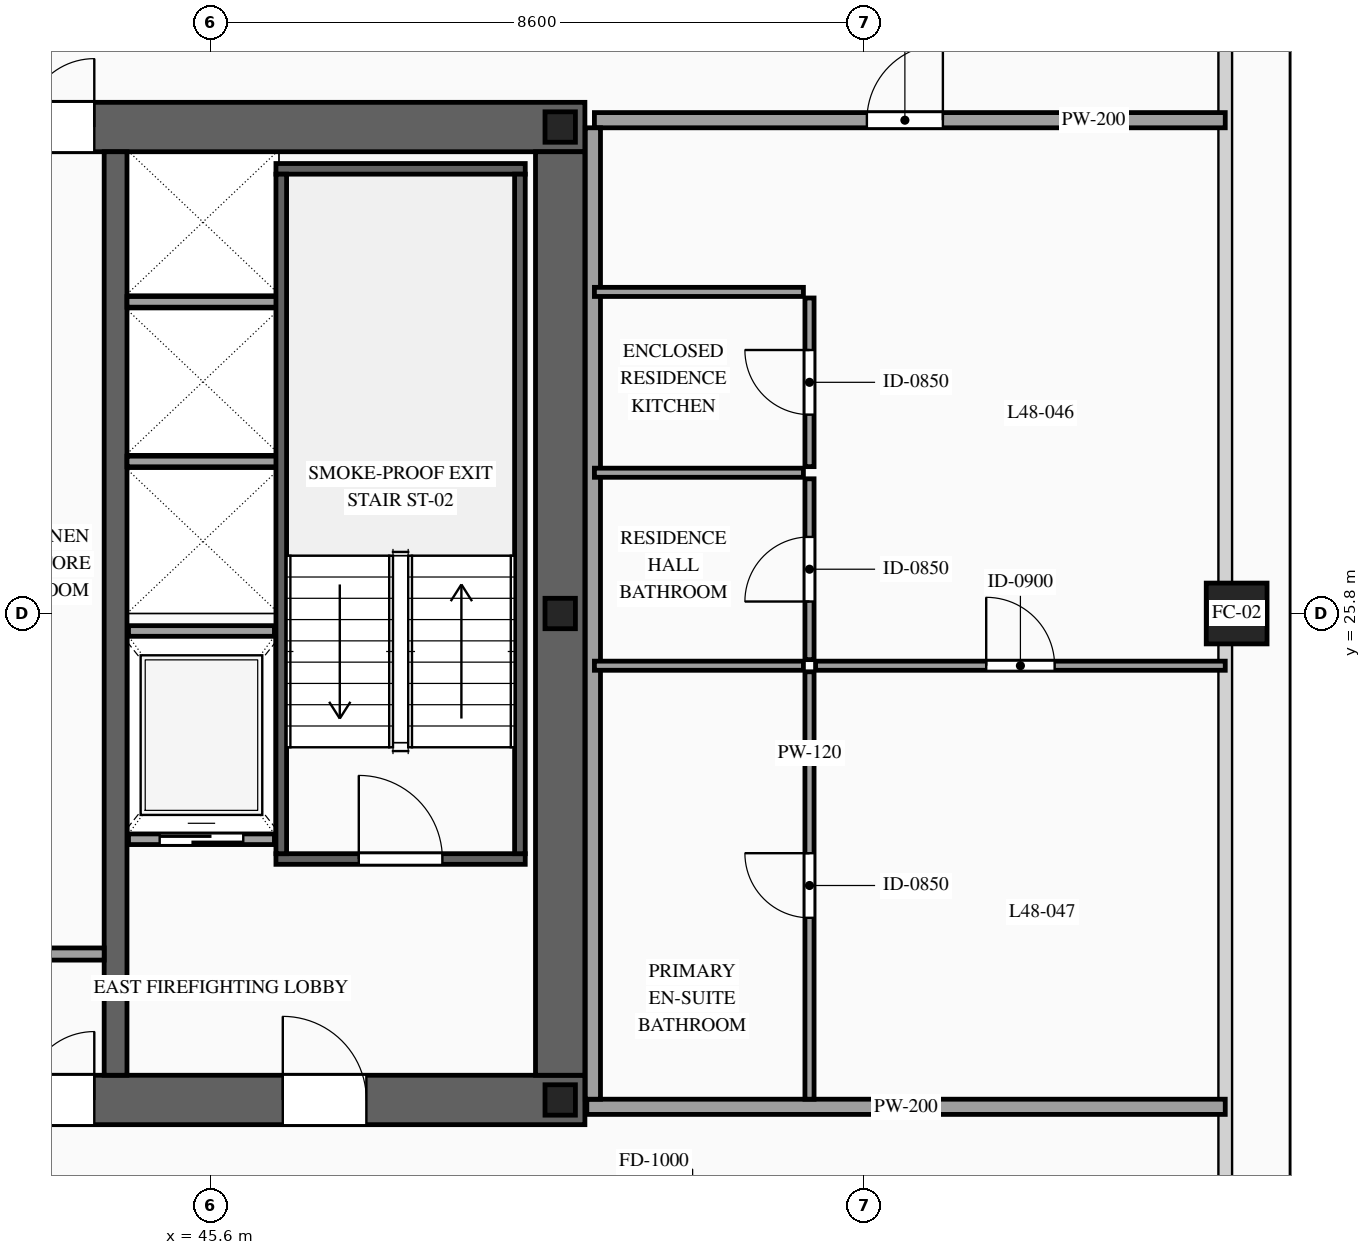
"""IFC4 building model, lengths in metres.
Left out: names, types, materials, properties, quantities, classifications, styles, units other than length and angle.
Written with IfcOpenShell. Run it as: python <this file> out.ifc"""

import sys

from ifc_helpers import new_model, si_unit, direction, frame, frame_2d, origin, origin_2d, place, context, subcontext, project, spatial, rectangle, hollow_rectangle, i_section, extrude, source, transform, mapped, element, fill, save


model = new_model("IFC4")
c1 = context("Model", 3, precision=1e-05, world=origin(), true_north=direction((0.0, 1.0)))
c2 = subcontext(c1, "Body", "Model", "MODEL_VIEW")
j1 = project(units=[si_unit("LENGTHUNIT", "METRE"), si_unit("PLANEANGLEUNIT", "RADIAN")], contexts=[c1])
p1 = place(None, origin())
s1 = spatial("IfcSite", under=j1, at=p1, CompositionType="ELEMENT")
p2 = place(p1, origin())
s2 = spatial("IfcBuilding", under=s1, at=p2, CompositionType="ELEMENT")
p3 = place(p2, frame((0.0, 0.0, 184.5)))
s3 = spatial("IfcBuildingStorey", under=s2, at=p3, CompositionType="ELEMENT", Elevation=184.5)
p4 = place(p3, frame((23.475, 19.4, 0.0), z_axis=(0.0, 0.0, 1.0), x_axis=(1.0, 0.0, 0.0)))
e1 = element("IfcWall", 1, at=p4, inside=s3, PredefinedType="SHEAR", context=c2, shape_type="SweptSolid", body=[
    extrude(rectangle(XDim=27.05, YDim=0.65, at=frame_2d((13.525, 0.0))), origin(), (0.0, 0.0, 1.0), 3.5),
])
p5 = place(p4, frame((1.975, 0.0, 0.0)))
e2 = element("IfcOpeningElement", 2, at=p5, cuts=e1, PredefinedType="OPENING", context=c2, shape_type="SweptSolid", body=[
    extrude(rectangle(XDim=1.1, YDim=2.2, at=frame_2d((0.55, 1.1))), frame((0.0, 0.34, 0.0), z_axis=(0.0, -1.0, 0.0), x_axis=(1.0, 0.0, 0.0)), (0.0, 0.0, 1.0), 0.68),
])
p6 = place(p4, frame((9.875, 0.0, 0.0)))
e3 = element("IfcOpeningElement", 3, at=p6, cuts=e1, PredefinedType="OPENING", context=c2, shape_type="SweptSolid", body=[
    extrude(rectangle(XDim=1.1, YDim=2.2, at=frame_2d((0.55, 1.1))), frame((0.0, 0.34, 0.0), z_axis=(0.0, -1.0, 0.0), x_axis=(1.0, 0.0, 0.0)), (0.0, 0.0, 1.0), 0.68),
])
p7 = place(p4, frame((23.075, 0.0, 0.0)))
e4 = element("IfcOpeningElement", 4, at=p7, cuts=e1, PredefinedType="OPENING", context=c2, shape_type="SweptSolid", body=[
    extrude(rectangle(XDim=1.1, YDim=2.2, at=frame_2d((0.55, 1.1))), frame((0.0, 0.34, 0.0), z_axis=(0.0, -1.0, 0.0), x_axis=(1.0, 0.0, 0.0)), (0.0, 0.0, 1.0), 0.68),
])
p8 = place(p4, frame((19.695, 0.0, 0.0)))
e5 = element("IfcOpeningElement", 5, at=p8, cuts=e1, PredefinedType="OPENING", context=c2, shape_type="SweptSolid", body=[
    extrude(rectangle(XDim=0.9, YDim=2.15, at=frame_2d((0.45, 1.075))), frame((0.0, 0.34, 0.0), z_axis=(0.0, -1.0, 0.0), x_axis=(1.0, 0.0, 0.0)), (0.0, 0.0, 1.0), 0.68),
])
p9 = place(p4, frame((18.255, 0.0, 0.0)))
e6 = element("IfcOpeningElement", 6, at=p9, cuts=e1, PredefinedType="OPENING", context=c2, shape_type="SweptSolid", body=[
    extrude(rectangle(XDim=0.9, YDim=2.15, at=frame_2d((0.45, 1.075))), frame((0.0, 0.34, 0.0), z_axis=(0.0, -1.0, 0.0), x_axis=(1.0, 0.0, 0.0)), (0.0, 0.0, 1.0), 0.68),
])
p10 = place(p3, frame((23.475, 32.2, 0.0), z_axis=(0.0, 0.0, 1.0), x_axis=(1.0, 0.0, 0.0)))
e7 = element("IfcWall", 7, at=p10, inside=s3, PredefinedType="SHEAR", context=c2, shape_type="SweptSolid", body=[
    extrude(rectangle(XDim=27.05, YDim=0.65, at=frame_2d((13.525, 0.0))), origin(), (0.0, 0.0, 1.0), 3.5),
])
p11 = place(p10, frame((4.595, 0.0, 0.0)))
e8 = element("IfcOpeningElement", 8, at=p11, cuts=e7, PredefinedType="OPENING", context=c2, shape_type="SweptSolid", body=[
    extrude(rectangle(XDim=0.9, YDim=2.15, at=frame_2d((0.45, 1.075))), frame((0.0, 0.34, 0.0), z_axis=(0.0, -1.0, 0.0), x_axis=(1.0, 0.0, 0.0)), (0.0, 0.0, 1.0), 0.68),
])
p12 = place(p10, frame((9.875, 0.0, 0.0)))
e9 = element("IfcOpeningElement", 9, at=p12, cuts=e7, PredefinedType="OPENING", context=c2, shape_type="SweptSolid", body=[
    extrude(rectangle(XDim=1.1, YDim=2.2, at=frame_2d((0.55, 1.1))), frame((0.0, 0.34, 0.0), z_axis=(0.0, -1.0, 0.0), x_axis=(1.0, 0.0, 0.0)), (0.0, 0.0, 1.0), 0.68),
])
p13 = place(p10, frame((15.725, 0.0, 0.0)))
e10 = element("IfcOpeningElement", 10, at=p13, cuts=e7, PredefinedType="OPENING", context=c2, shape_type="SweptSolid", body=[
    extrude(rectangle(XDim=1.1, YDim=2.2, at=frame_2d((0.55, 1.1))), frame((0.0, 0.34, 0.0), z_axis=(0.0, -1.0, 0.0), x_axis=(1.0, 0.0, 0.0)), (0.0, 0.0, 1.0), 0.68),
])
p14 = place(p10, frame((19.695, 0.0, 0.0)))
e11 = element("IfcOpeningElement", 11, at=p14, cuts=e7, PredefinedType="OPENING", context=c2, shape_type="SweptSolid", body=[
    extrude(rectangle(XDim=0.9, YDim=2.15, at=frame_2d((0.45, 1.075))), frame((0.0, 0.34, 0.0), z_axis=(0.0, -1.0, 0.0), x_axis=(1.0, 0.0, 0.0)), (0.0, 0.0, 1.0), 0.68),
])
m1 = source(origin(), c2, "Body", "SweptSolid", [
    extrude(rectangle(XDim=12.15, YDim=0.65, at=frame_2d((6.075, 0.0))), origin(), (0.0, 0.0, 1.0), 3.5),
])
p15 = place(p3, frame((50.2, 19.725, 0.0), z_axis=(0.0, 0.0, 1.0), x_axis=(0.0, 1.0, 0.0)))
e12 = element("IfcWall", 12, at=p15, inside=s3, PredefinedType="SHEAR", context=c2, shape_type="MappedRepresentation", body=[
    mapped(m1, transform((0.0, 0.0, 0.0), scale=1.0)),
])
m2 = source(origin(), c2, "Body", "SweptSolid", [
    extrude(rectangle(XDim=12.15, YDim=0.3, at=frame_2d((6.075, 0.0))), origin(), (0.0, 0.0, 1.0), 3.5),
])
p16 = place(p3, frame((44.35, 19.725, 0.0), z_axis=(0.0, 0.0, 1.0), x_axis=(0.0, 1.0, 0.0)))
e13 = element("IfcWall", 13, at=p16, inside=s3, PredefinedType="SOLIDWALL", context=c2, shape_type="MappedRepresentation", body=[
    mapped(m2, transform((0.0, 0.0, 0.0), scale=1.0)),
])
m3 = source(origin(), c2, "Body", "SweptSolid", [
    extrude(i_section(OverallWidth=0.4, OverallDepth=0.4, WebThickness=0.013, FlangeThickness=0.021, at=origin_2d()), origin(), (0.0, 0.0, 1.0), 3.5),
])
for number, where, z_axis, x_axis in (
    (14, (50.2, 19.4, 0.0), (0.0, 0.0, 1.0), (1.0, 0.0, 0.0)),
    (15, (50.2, 25.8, 0.0), (0.0, 0.0, 1.0), (1.0, 0.0, 0.0)),
    (16, (50.2, 32.2, 0.0), (0.0, 0.0, 1.0), (1.0, 0.0, 0.0)),
):
    element("IfcColumn", number, at=place(p3, frame(where, z_axis=z_axis, x_axis=x_axis)), inside=s3, PredefinedType="COLUMN", context=c2, shape_type="MappedRepresentation", body=[
        mapped(m3, transform((0.0, 0.0, 0.0), scale=1.0)),
    ])
m4 = source(origin(), c2, "Body", "SweptSolid", [
    extrude(hollow_rectangle(XDim=0.8, YDim=0.8, WallThickness=0.036, at=origin_2d()), origin(), (0.0, 0.0, 1.0), 3.5),
])
p17 = place(p3, frame((59.1, 25.8, 0.0), z_axis=(0.0, 0.0, 1.0), x_axis=(1.0, 0.0, 0.0)))
e17 = element("IfcColumn", 17, at=p17, inside=s3, PredefinedType="COLUMN", context=c2, shape_type="MappedRepresentation", body=[
    mapped(m4, transform((0.0, 0.0, 0.0), scale=1.0)),
])
p18 = place(p3, frame((44.52, 22.83, 0.0), z_axis=(0.0, 0.0, 1.0), x_axis=(1.0, 0.0, 0.0)))
e18 = element("IfcWall", 18, at=p18, inside=s3, PredefinedType="SOLIDWALL", context=c2, shape_type="SweptSolid", body=[
    extrude(rectangle(XDim=1.92, YDim=0.14, at=frame_2d((0.96, 0.0))), origin(), (0.0, 0.0, 1.0), 3.28),
])
p19 = place(p18, frame((0.41, 0.0, 0.0)))
e19 = element("IfcOpeningElement", 19, at=p19, cuts=e18, PredefinedType="OPENING", context=c2, shape_type="SweptSolid", body=[
    extrude(rectangle(XDim=1.1, YDim=2.2, at=frame_2d((0.55, 1.1))), frame((0.0, 0.085, 0.0), z_axis=(0.0, -1.0, 0.0), x_axis=(1.0, 0.0, 0.0)), (0.0, 0.0, 1.0), 0.17),
])
m5 = source(origin(), c2, "Body", "SweptSolid", [
    extrude(rectangle(XDim=1.92, YDim=0.14, at=frame_2d((0.96, 0.0))), origin(), (0.0, 0.0, 1.0), 3.28),
])
p20 = place(p3, frame((44.52, 25.57, 0.0), z_axis=(0.0, 0.0, 1.0), x_axis=(1.0, 0.0, 0.0)))
e20 = element("IfcWall", 20, at=p20, inside=s3, PredefinedType="SOLIDWALL", context=c2, shape_type="MappedRepresentation", body=[
    mapped(m5, transform((0.0, 0.0, 0.0), scale=1.0)),
])
m6 = source(origin(), c2, "Body", "SweptSolid", [
    extrude(rectangle(XDim=2.0, YDim=0.14, at=frame_2d((1.0, 0.0))), origin(), (0.0, 0.0, 1.0), 3.28),
])
for number, where, z_axis, x_axis in (
    (21, (44.5, 27.8, 0.0), (0.0, 0.0, 1.0), (1.0, 0.0, 0.0)),
    (22, (44.5, 29.9, 0.0), (0.0, 0.0, 1.0), (1.0, 0.0, 0.0)),
):
    element("IfcWall", number, at=place(p3, frame(where, z_axis=z_axis, x_axis=x_axis)), inside=s3, PredefinedType="SOLIDWALL", context=c2, shape_type="MappedRepresentation", body=[
        mapped(m6, transform((0.0, 0.0, 0.0), scale=1.0)),
    ])
p21 = place(p3, frame((46.46, 22.57, 0.0), z_axis=(0.0, 0.0, 1.0), x_axis=(1.0, 0.0, 0.0)))
e23 = element("IfcWall", 23, at=p21, inside=s3, PredefinedType="SOLIDWALL", context=c2, shape_type="SweptSolid", body=[
    extrude(rectangle(XDim=3.28, YDim=0.14, at=frame_2d((1.64, 0.0))), origin(), (0.0, 0.0, 1.0), 3.28),
])
p22 = place(p21, frame((1.09, 0.0, 0.0)))
e24 = element("IfcOpeningElement", 24, at=p22, cuts=e23, PredefinedType="OPENING", context=c2, shape_type="SweptSolid", body=[
    extrude(rectangle(XDim=1.1, YDim=2.2, at=frame_2d((0.55, 1.1))), frame((0.0, 0.085, 0.0), z_axis=(0.0, -1.0, 0.0), x_axis=(1.0, 0.0, 0.0)), (0.0, 0.0, 1.0), 0.17),
])
m7 = source(origin(), c2, "Body", "SweptSolid", [
    extrude(rectangle(XDim=3.28, YDim=0.14, at=frame_2d((1.64, 0.0))), origin(), (0.0, 0.0, 1.0), 3.28),
])
p23 = place(p3, frame((46.46, 31.65, 0.0), z_axis=(0.0, 0.0, 1.0), x_axis=(1.0, 0.0, 0.0)))
e25 = element("IfcWall", 25, at=p23, inside=s3, PredefinedType="SOLIDWALL", context=c2, shape_type="MappedRepresentation", body=[
    mapped(m7, transform((0.0, 0.0, 0.0), scale=1.0)),
])
m8 = source(origin(), c2, "Body", "SweptSolid", [
    extrude(rectangle(XDim=8.94, YDim=0.14, at=frame_2d((4.47, 0.0))), origin(), (0.0, 0.0, 1.0), 3.28),
])
for number, where, z_axis, x_axis in (
    (26, (46.53, 22.64, 0.0), (0.0, 0.0, 1.0), (0.0, 1.0, 0.0)),
    (27, (49.67, 22.64, 0.0), (0.0, 0.0, 1.0), (0.0, 1.0, 0.0)),
):
    element("IfcWall", number, at=place(p3, frame(where, z_axis=z_axis, x_axis=x_axis)), inside=s3, PredefinedType="SOLIDWALL", context=c2, shape_type="MappedRepresentation", body=[
        mapped(m8, transform((0.0, 0.0, 0.0), scale=1.0)),
    ])
m9 = source(origin(), c2, "Body", "SweptSolid", [
    extrude(rectangle(XDim=1.17, YDim=0.16, at=frame_2d((0.585, 0.0))), origin(), (0.0, 0.0, 1.0), 3.28),
])
p24 = place(p3, frame((43.03, 21.32, 0.0), z_axis=(0.0, 0.0, 1.0), x_axis=(1.0, 0.0, 0.0)))
e28 = element("IfcWall", 28, at=p24, inside=s3, PredefinedType="PARTITIONING", context=c2, shape_type="MappedRepresentation", body=[
    mapped(m9, transform((0.0, 0.0, 0.0), scale=1.0)),
])
p25 = place(p3, frame((50.65, 32.29, 0.0), z_axis=(0.0, 0.0, 1.0), x_axis=(1.0, 0.0, 0.0)))
e29 = element("IfcWall", 29, at=p25, inside=s3, PredefinedType="PARTITIONING", context=c2, shape_type="SweptSolid", body=[
    extrude(rectangle(XDim=8.3, YDim=0.2, at=frame_2d((4.15, 0.0))), origin(), (0.0, 0.0, 1.0), 2.775),
])
p26 = place(p25, frame((3.585, 0.0, 0.0)))
e30 = element("IfcOpeningElement", 30, at=p26, cuts=e29, PredefinedType="OPENING", context=c2, shape_type="SweptSolid", body=[
    extrude(rectangle(XDim=1.0, YDim=2.2, at=frame_2d((0.5, 1.1))), frame((0.0, 0.115, 0.0), z_axis=(0.0, -1.0, 0.0), x_axis=(1.0, 0.0, 0.0)), (0.0, 0.0, 1.0), 0.23),
])
m10 = source(origin(), c2, "Body", "SweptSolid", [
    extrude(rectangle(XDim=8.4, YDim=0.2, at=frame_2d((4.2, 0.0))), origin(), (0.0, 0.0, 1.0), 2.775),
])
p27 = place(p3, frame((50.55, 19.31, 0.0), z_axis=(0.0, 0.0, 1.0), x_axis=(1.0, 0.0, 0.0)))
e31 = element("IfcWall", 31, at=p27, inside=s3, PredefinedType="PARTITIONING", context=c2, shape_type="MappedRepresentation", body=[
    mapped(m10, transform((0.0, 0.0, 0.0), scale=1.0)),
])
m11 = source(origin(), c2, "Body", "SweptSolid", [
    extrude(rectangle(XDim=12.78, YDim=0.2, at=frame_2d((6.39, 0.0))), origin(), (0.0, 0.0, 1.0), 3.28),
])
p28 = place(p3, frame((50.63, 19.41, 0.0), z_axis=(0.0, 0.0, 1.0), x_axis=(0.0, 1.0, 0.0)))
e32 = element("IfcWall", 32, at=p28, inside=s3, PredefinedType="PARTITIONING", context=c2, shape_type="MappedRepresentation", body=[
    mapped(m11, transform((0.0, 0.0, 0.0), scale=1.0)),
])
m12 = source(origin(), c2, "Body", "SweptSolid", [
    extrude(rectangle(XDim=2.75, YDim=0.12, at=frame_2d((1.375, 0.0))), origin(), (0.0, 0.0, 1.0), 3.28),
])
for number, where, z_axis, x_axis in (
    (33, (50.65, 25.113, 0.0), (0.0, 0.0, 1.0), (1.0, 0.0, 0.0)),
    (34, (50.65, 27.652, 0.0), (0.0, 0.0, 1.0), (1.0, 0.0, 0.0)),
):
    element("IfcWall", number, at=place(p3, frame(where, z_axis=z_axis, x_axis=x_axis)), inside=s3, PredefinedType="PARTITIONING", context=c2, shape_type="MappedRepresentation", body=[
        mapped(m12, transform((0.0, 0.0, 0.0), scale=1.0)),
    ])
p29 = place(p3, frame((53.48, 25.193, 0.0), z_axis=(0.0, 0.0, 1.0), x_axis=(0.0, 1.0, 0.0)))
e35 = element("IfcWall", 35, at=p29, inside=s3, PredefinedType="PARTITIONING", context=c2, shape_type="SweptSolid", body=[
    extrude(rectangle(XDim=2.379, YDim=0.12, at=frame_2d((1.189, 0.0))), origin(), (0.0, 0.0, 1.0), 3.28),
])
p30 = place(p29, frame((0.764, 0.0, 0.0)))
e36 = element("IfcOpeningElement", 36, at=p30, cuts=e35, PredefinedType="OPENING", context=c2, shape_type="SweptSolid", body=[
    extrude(rectangle(XDim=0.85, YDim=2.1, at=frame_2d((0.425, 1.05))), frame((0.0, 0.075, 0.0), z_axis=(0.0, -1.0, 0.0), x_axis=(1.0, 0.0, 0.0)), (0.0, 0.0, 1.0), 0.15),
])
p31 = place(p3, frame((50.65, 30.031, 0.0), z_axis=(0.0, 0.0, 1.0), x_axis=(1.0, 0.0, 0.0)))
e37 = element("IfcWall", 37, at=p31, inside=s3, PredefinedType="PARTITIONING", context=c2, shape_type="MappedRepresentation", body=[
    mapped(m12, transform((0.0, 0.0, 0.0), scale=1.0)),
])
p32 = place(p3, frame((53.48, 27.732, 0.0), z_axis=(0.0, 0.0, 1.0), x_axis=(0.0, 1.0, 0.0)))
e38 = element("IfcWall", 38, at=p32, inside=s3, PredefinedType="PARTITIONING", context=c2, shape_type="SweptSolid", body=[
    extrude(rectangle(XDim=2.219, YDim=0.12, at=frame_2d((1.109, 0.0))), origin(), (0.0, 0.0, 1.0), 3.28),
])
p33 = place(p32, frame((0.685, 0.0, 0.0)))
e39 = element("IfcOpeningElement", 39, at=p33, cuts=e38, PredefinedType="OPENING", context=c2, shape_type="SweptSolid", body=[
    extrude(rectangle(XDim=0.85, YDim=2.1, at=frame_2d((0.425, 1.05))), frame((0.0, 0.075, 0.0), z_axis=(0.0, -1.0, 0.0), x_axis=(1.0, 0.0, 0.0)), (0.0, 0.0, 1.0), 0.15),
])
p34 = place(p3, frame((53.56, 25.113, 0.0), z_axis=(0.0, 0.0, 1.0), x_axis=(1.0, 0.0, 0.0)))
e40 = element("IfcWall", 40, at=p34, inside=s3, PredefinedType="PARTITIONING", context=c2, shape_type="SweptSolid", body=[
    extrude(rectangle(XDim=5.39, YDim=0.12, at=frame_2d((2.695, 0.0))), origin(), (0.0, 0.0, 1.0), 3.28),
])
p35 = place(p34, frame((2.245, 0.0, 0.0)))
e41 = element("IfcOpeningElement", 41, at=p35, cuts=e40, PredefinedType="OPENING", context=c2, shape_type="SweptSolid", body=[
    extrude(rectangle(XDim=0.9, YDim=2.15, at=frame_2d((0.45, 1.075))), frame((0.0, 0.075, 0.0), z_axis=(0.0, -1.0, 0.0), x_axis=(1.0, 0.0, 0.0)), (0.0, 0.0, 1.0), 0.15),
])
p36 = place(p3, frame((53.48, 19.41, 0.0), z_axis=(0.0, 0.0, 1.0), x_axis=(0.0, 1.0, 0.0)))
e42 = element("IfcWall", 42, at=p36, inside=s3, PredefinedType="PARTITIONING", context=c2, shape_type="SweptSolid", body=[
    extrude(rectangle(XDim=5.623, YDim=0.12, at=frame_2d((2.812, 0.0))), origin(), (0.0, 0.0, 1.0), 3.28),
])
p37 = place(p36, frame((2.386, 0.0, 0.0)))
e43 = element("IfcOpeningElement", 43, at=p37, cuts=e42, PredefinedType="OPENING", context=c2, shape_type="SweptSolid", body=[
    extrude(rectangle(XDim=0.85, YDim=2.1, at=frame_2d((0.425, 1.05))), frame((0.0, 0.075, 0.0), z_axis=(0.0, -1.0, 0.0), x_axis=(1.0, 0.0, 0.0)), (0.0, 0.0, 1.0), 0.15),
])
m13 = source(origin(), c2, "Body", "SweptSolid", [
    extrude(rectangle(XDim=1.1, YDim=2.2, at=frame_2d((0.55, 1.1))), frame((0.0, 0.025, 0.0), z_axis=(0.0, -1.0, 0.0), x_axis=(1.0, 0.0, 0.0)), (0.0, 0.0, 1.0), 0.05),
])
p38 = place(p19, origin())
e44 = element("IfcDoor", 44, at=p38, inside=s3, OperationType="SLIDING_TO_RIGHT", PredefinedType="DOOR", context=c2, shape_type="MappedRepresentation", body=[
    mapped(m13, transform((0.0, 0.0, 0.0), scale=1.0)),
])
fill(e19, e44)
m14 = source(origin(), c2, "Body", "SweptSolid", [
    extrude(rectangle(XDim=1.1, YDim=2.2, at=frame_2d((0.55, 1.1))), frame((0.0, 0.025, 0.0), z_axis=(0.0, -1.0, 0.0), x_axis=(1.0, 0.0, 0.0)), (0.0, 0.0, 1.0), 0.05),
])
p39 = place(p22, origin())
e45 = element("IfcDoor", 45, at=p39, inside=s3, OperationType="SINGLE_SWING_LEFT", PredefinedType="DOOR", context=c2, shape_type="MappedRepresentation", body=[
    mapped(m14, transform((0.0, 0.0, 0.0), scale=1.0)),
])
fill(e24, e45)
p40 = place(p7, origin())
e46 = element("IfcDoor", 46, at=p40, inside=s3, OperationType="SINGLE_SWING_LEFT", PredefinedType="DOOR", context=c2, shape_type="MappedRepresentation", body=[
    mapped(m14, transform((0.0, 0.0, 0.0), scale=1.0)),
])
fill(e4, e46)
m15 = source(origin(), c2, "Body", "SweptSolid", [
    extrude(rectangle(XDim=0.9, YDim=2.15, at=frame_2d((0.45, 1.075))), frame((0.0, 0.025, 0.0), z_axis=(0.0, -1.0, 0.0), x_axis=(1.0, 0.0, 0.0)), (0.0, 0.0, 1.0), 0.05),
])
p41 = place(p8, origin())
e47 = element("IfcDoor", 47, at=p41, inside=s3, OperationType="SINGLE_SWING_RIGHT", PredefinedType="DOOR", context=c2, shape_type="MappedRepresentation", body=[
    mapped(m15, transform((0.0, 0.0, 0.0), scale=1.0)),
])
fill(e5, e47)
p42 = place(p14, origin())
e48 = element("IfcDoor", 48, at=p42, inside=s3, OperationType="SINGLE_SWING_RIGHT", PredefinedType="DOOR", context=c2, shape_type="MappedRepresentation", body=[
    mapped(m15, transform((0.0, 0.0, 0.0), scale=1.0)),
])
fill(e11, e48)
m16 = source(origin(), c2, "Body", "SweptSolid", [
    extrude(rectangle(XDim=1.0, YDim=2.2, at=frame_2d((0.5, 1.1))), frame((0.0, 0.025, 0.0), z_axis=(0.0, -1.0, 0.0), x_axis=(1.0, 0.0, 0.0)), (0.0, 0.0, 1.0), 0.05),
])
p43 = place(p26, origin())
e49 = element("IfcDoor", 49, at=p43, inside=s3, OperationType="SINGLE_SWING_RIGHT", PredefinedType="DOOR", context=c2, shape_type="MappedRepresentation", body=[
    mapped(m16, transform((0.0, 0.0, 0.0), scale=1.0)),
])
fill(e30, e49)
m17 = source(origin(), c2, "Body", "SweptSolid", [
    extrude(rectangle(XDim=0.85, YDim=2.1, at=frame_2d((0.425, 1.05))), frame((0.0, 0.025, 0.0), z_axis=(0.0, -1.0, 0.0), x_axis=(1.0, 0.0, 0.0)), (0.0, 0.0, 1.0), 0.05),
])
p44 = place(p30, origin())
e50 = element("IfcDoor", 50, at=p44, inside=s3, OperationType="SINGLE_SWING_LEFT", PredefinedType="DOOR", context=c2, shape_type="MappedRepresentation", body=[
    mapped(m17, transform((0.0, 0.0, 0.0), scale=1.0)),
])
fill(e36, e50)
p45 = place(p33, origin())
e51 = element("IfcDoor", 51, at=p45, inside=s3, OperationType="SINGLE_SWING_RIGHT", PredefinedType="DOOR", context=c2, shape_type="MappedRepresentation", body=[
    mapped(m17, transform((0.0, 0.0, 0.0), scale=1.0)),
])
fill(e39, e51)
m18 = source(origin(), c2, "Body", "SweptSolid", [
    extrude(rectangle(XDim=0.9, YDim=2.15, at=frame_2d((0.45, 1.075))), frame((0.0, 0.025, 0.0), z_axis=(0.0, -1.0, 0.0), x_axis=(1.0, 0.0, 0.0)), (0.0, 0.0, 1.0), 0.05),
])
p46 = place(p35, origin())
e52 = element("IfcDoor", 52, at=p46, inside=s3, OperationType="SINGLE_SWING_LEFT", PredefinedType="DOOR", context=c2, shape_type="MappedRepresentation", body=[
    mapped(m18, transform((0.0, 0.0, 0.0), scale=1.0)),
])
fill(e41, e52)
p47 = place(p37, origin())
e53 = element("IfcDoor", 53, at=p47, inside=s3, OperationType="SINGLE_SWING_RIGHT", PredefinedType="DOOR", context=c2, shape_type="MappedRepresentation", body=[
    mapped(m17, transform((0.0, 0.0, 0.0), scale=1.0)),
])
fill(e43, e53)
save(model, sys.argv[1])
